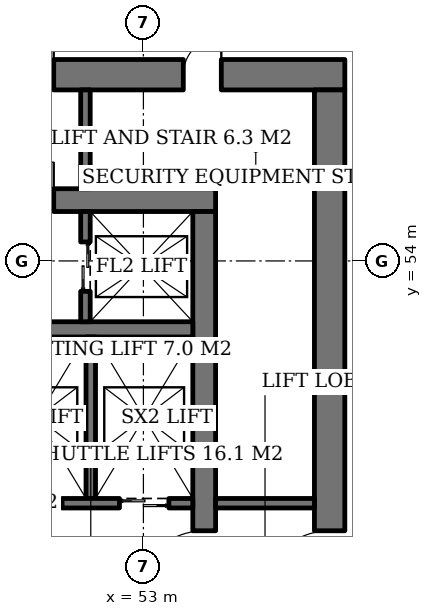
"""IFC4 building model, lengths in metres.
Left out: names, types, materials, properties, quantities, classifications, styles, units other than length and angle.
Written with IfcOpenShell. Run it as: python <this file> out.ifc"""

import sys

from ifc_helpers import new_model, si_unit, direction, frame, frame_2d, origin, place, context, subcontext, project, spatial, rectangle, extrude, element, fill, save


model = new_model("IFC4")
c1 = context("Model", 3, precision=1e-05, world=origin(), true_north=direction((0.0, 1.0)))
c2 = subcontext(c1, "Body", "Model", "MODEL_VIEW")
j1 = project(units=[si_unit("LENGTHUNIT", "METRE"), si_unit("PLANEANGLEUNIT", "RADIAN")], contexts=[c1])
p1 = place(None, origin())
s1 = spatial("IfcSite", under=j1, at=p1, CompositionType="ELEMENT")
p2 = place(p1, origin())
s2 = spatial("IfcBuilding", under=s1, at=p2, CompositionType="ELEMENT")
p3 = place(p2, origin())
s3 = spatial("IfcBuildingStorey", under=s2, at=p3, CompositionType="ELEMENT", Elevation=0.0)
p4 = place(p3, frame((35.1, 55.6, 0.0), z_axis=(0.0, 0.0, 1.0), x_axis=(1.0, 0.0, 0.0)))
e1 = element("IfcWall", 1, at=p4, inside=s3, PredefinedType="SHEAR", context=c2, shape_type="SweptSolid", body=[
    extrude(rectangle(XDim=19.8, YDim=0.6, at=frame_2d((9.9, 0.0))), origin(), (0.0, 0.0, 1.0), 6.0),
])
p5 = place(p4, frame((14.54, 0.0, 0.0)))
e2 = element("IfcOpeningElement", 2, at=p5, cuts=e1, PredefinedType="OPENING", context=c2, shape_type="SweptSolid", body=[
    extrude(rectangle(XDim=1.0, YDim=2.1, at=frame_2d((0.5, 1.05))), frame((0.0, 0.31, 0.0), z_axis=(0.0, -1.0, 0.0), x_axis=(1.0, 0.0, 0.0)), (0.0, 0.0, 1.0), 0.62),
])
p6 = place(p4, frame((12.18, 0.0, 0.0)))
e3 = element("IfcOpeningElement", 3, at=p6, cuts=e1, PredefinedType="OPENING", context=c2, shape_type="SweptSolid", body=[
    extrude(rectangle(XDim=1.0, YDim=2.1, at=frame_2d((0.5, 1.05))), frame((0.0, 0.31, 0.0), z_axis=(0.0, -1.0, 0.0), x_axis=(1.0, 0.0, 0.0)), (0.0, 0.0, 1.0), 0.62),
])
p7 = place(p4, frame((2.425, 0.0, 0.0)))
e4 = element("IfcOpeningElement", 4, at=p7, cuts=e1, PredefinedType="OPENING", context=c2, shape_type="SweptSolid", body=[
    extrude(rectangle(XDim=1.0, YDim=2.1, at=frame_2d((0.5, 1.05))), frame((0.0, 0.31, 0.0), z_axis=(0.0, -1.0, 0.0), x_axis=(1.0, 0.0, 0.0)), (0.0, 0.0, 1.0), 0.62),
])
p8 = place(p3, frame((54.6, 36.7, 0.0), z_axis=(0.0, 0.0, 1.0), x_axis=(0.0, 1.0, 0.0)))
e5 = element("IfcWall", 5, at=p8, inside=s3, PredefinedType="SHEAR", context=c2, shape_type="SweptSolid", body=[
    extrude(rectangle(XDim=18.6, YDim=0.6, at=frame_2d((9.3, 0.0))), origin(), (0.0, 0.0, 1.0), 6.0),
])
p9 = place(p8, frame((8.4, 0.0, 0.0)))
e6 = element("IfcOpeningElement", 6, at=p9, cuts=e5, PredefinedType="OPENING", context=c2, shape_type="SweptSolid", body=[
    extrude(rectangle(XDim=1.8, YDim=2.4, at=frame_2d((0.9, 1.2))), frame((0.0, 0.31, 0.0), z_axis=(0.0, -1.0, 0.0), x_axis=(1.0, 0.0, 0.0)), (0.0, 0.0, 1.0), 0.62),
])
p10 = place(p3, frame((31.7, 58.9, 0.0), z_axis=(0.0, 0.0, 1.0), x_axis=(1.0, 0.0, 0.0)))
e7 = element("IfcWall", 7, at=p10, inside=s3, PredefinedType="SHEAR", context=c2, shape_type="SweptSolid", body=[
    extrude(rectangle(XDim=26.6, YDim=0.8, at=frame_2d((13.3, 0.0))), origin(), (0.0, 0.0, 1.0), 6.0),
])
p11 = place(p10, frame((17.94, 0.0, 0.0)))
e8 = element("IfcOpeningElement", 8, at=p11, cuts=e7, PredefinedType="OPENING", context=c2, shape_type="SweptSolid", body=[
    extrude(rectangle(XDim=1.0, YDim=2.1, at=frame_2d((0.5, 1.05))), frame((0.0, 0.41, 0.0), z_axis=(0.0, -1.0, 0.0), x_axis=(1.0, 0.0, 0.0)), (0.0, 0.0, 1.0), 0.82),
])
p12 = place(p10, frame((12.44, 0.0, 0.0)))
e9 = element("IfcOpeningElement", 9, at=p12, cuts=e7, PredefinedType="OPENING", context=c2, shape_type="SweptSolid", body=[
    extrude(rectangle(XDim=1.0, YDim=2.1, at=frame_2d((0.5, 1.05))), frame((0.0, 0.41, 0.0), z_axis=(0.0, -1.0, 0.0), x_axis=(1.0, 0.0, 0.0)), (0.0, 0.0, 1.0), 0.82),
])
p13 = place(p10, frame((5.825, 0.0, 0.0)))
e10 = element("IfcOpeningElement", 10, at=p13, cuts=e7, PredefinedType="OPENING", context=c2, shape_type="SweptSolid", body=[
    extrude(rectangle(XDim=1.0, YDim=2.1, at=frame_2d((0.5, 1.05))), frame((0.0, 0.41, 0.0), z_axis=(0.0, -1.0, 0.0), x_axis=(1.0, 0.0, 0.0)), (0.0, 0.0, 1.0), 0.82),
])
p14 = place(p10, frame((1.9, 0.0, 0.0)))
e11 = element("IfcOpeningElement", 11, at=p14, cuts=e7, PredefinedType="OPENING", context=c2, shape_type="SweptSolid", body=[
    extrude(rectangle(XDim=1.0, YDim=2.1, at=frame_2d((0.5, 1.05))), frame((0.0, 0.41, 0.0), z_axis=(0.0, -1.0, 0.0), x_axis=(1.0, 0.0, 0.0)), (0.0, 0.0, 1.0), 0.82),
])
p15 = place(p10, frame((4.134, 0.0, 0.0)))
e12 = element("IfcOpeningElement", 12, at=p15, cuts=e7, PredefinedType="OPENING", context=c2, shape_type="SweptSolid", body=[
    extrude(rectangle(XDim=1.0, YDim=2.1, at=frame_2d((0.5, 1.05))), frame((0.0, 0.41, 0.0), z_axis=(0.0, -1.0, 0.0), x_axis=(1.0, 0.0, 0.0)), (0.0, 0.0, 1.0), 0.82),
])
p16 = place(p10, frame((22.35, 0.0, 0.0)))
e13 = element("IfcOpeningElement", 13, at=p16, cuts=e7, PredefinedType="OPENING", context=c2, shape_type="SweptSolid", body=[
    extrude(rectangle(XDim=1.0, YDim=2.1, at=frame_2d((0.5, 1.05))), frame((0.0, 0.41, 0.0), z_axis=(0.0, -1.0, 0.0), x_axis=(1.0, 0.0, 0.0)), (0.0, 0.0, 1.0), 0.82),
])
p17 = place(p3, frame((57.9, 33.5, 0.0), z_axis=(0.0, 0.0, 1.0), x_axis=(0.0, 1.0, 0.0)))
e14 = element("IfcWall", 14, at=p17, inside=s3, PredefinedType="SHEAR", context=c2, shape_type="SweptSolid", body=[
    extrude(rectangle(XDim=25.0, YDim=0.8, at=frame_2d((12.5, 0.0))), origin(), (0.0, 0.0, 1.0), 6.0),
])
p18 = place(p17, frame((11.6, 0.0, 0.0)))
e15 = element("IfcOpeningElement", 15, at=p18, cuts=e14, PredefinedType="OPENING", context=c2, shape_type="SweptSolid", body=[
    extrude(rectangle(XDim=1.8, YDim=2.4, at=frame_2d((0.9, 1.2))), frame((0.0, 0.41, 0.0), z_axis=(0.0, -1.0, 0.0), x_axis=(1.0, 0.0, 0.0)), (0.0, 0.0, 1.0), 0.82),
])
p19 = place(p3, frame((35.7, 52.2, 0.0), z_axis=(0.0, 0.0, 1.0), x_axis=(1.0, 0.0, 0.0)))
e16 = element("IfcWall", 16, at=p19, inside=s3, PredefinedType="SHEAR", context=c2, shape_type="SweptSolid", body=[
    extrude(rectangle(XDim=18.6, YDim=0.4, at=frame_2d((9.3, 0.0))), origin(), (0.0, 0.0, 1.0), 6.0),
])
p20 = place(p3, frame((51.475, 52.4, 0.0), z_axis=(0.0, 0.0, 1.0), x_axis=(0.0, 1.0, 0.0)))
e17 = element("IfcWall", 17, at=p20, inside=s3, PredefinedType="SHEAR", context=c2, shape_type="SweptSolid", body=[
    extrude(rectangle(XDim=2.9, YDim=0.25, at=frame_2d((1.45, 0.0))), origin(), (0.0, 0.0, 1.0), 6.0),
])
p21 = place(p20, frame((0.8, 0.0, 0.0)))
e18 = element("IfcOpeningElement", 18, at=p21, cuts=e17, PredefinedType="OPENING", context=c2, shape_type="SweptSolid", body=[
    extrude(rectangle(XDim=1.3, YDim=2.2, at=frame_2d((0.65, 1.1))), frame((0.0, 0.135, 0.0), z_axis=(0.0, -1.0, 0.0), x_axis=(1.0, 0.0, 0.0)), (0.0, 0.0, 1.0), 0.27),
])
p22 = place(p3, frame((51.615, 47.75, 0.0), z_axis=(0.0, 0.0, 1.0), x_axis=(0.0, 1.0, 0.0)))
e19 = element("IfcWall", 19, at=p22, inside=s3, PredefinedType="SHEAR", context=c2, shape_type="SweptSolid", body=[
    extrude(rectangle(XDim=4.25, YDim=0.25, at=frame_2d((2.125, 0.0))), origin(), (0.0, 0.0, 1.0), 6.0),
])
p23 = place(p3, frame((48.93, 47.625, 0.0), z_axis=(0.0, 0.0, 1.0), x_axis=(1.0, 0.0, 0.0)))
e20 = element("IfcWall", 20, at=p23, inside=s3, PredefinedType="SHEAR", context=c2, shape_type="SweptSolid", body=[
    extrude(rectangle(XDim=5.37, YDim=0.25, at=frame_2d((2.685, 0.0))), origin(), (0.0, 0.0, 1.0), 6.0),
])
p24 = place(p23, frame((0.63, 0.0, 0.0)))
e21 = element("IfcOpeningElement", 21, at=p24, cuts=e20, PredefinedType="OPENING", context=c2, shape_type="SweptSolid", body=[
    extrude(rectangle(XDim=1.3, YDim=2.2, at=frame_2d((0.65, 1.1))), frame((0.0, 0.135, 0.0), z_axis=(0.0, -1.0, 0.0), x_axis=(1.0, 0.0, 0.0)), (0.0, 0.0, 1.0), 0.27),
])
p25 = place(p23, frame((3.44, 0.0, 0.0)))
e22 = element("IfcOpeningElement", 22, at=p25, cuts=e20, PredefinedType="OPENING", context=c2, shape_type="SweptSolid", body=[
    extrude(rectangle(XDim=1.3, YDim=2.2, at=frame_2d((0.65, 1.1))), frame((0.0, 0.135, 0.0), z_axis=(0.0, -1.0, 0.0), x_axis=(1.0, 0.0, 0.0)), (0.0, 0.0, 1.0), 0.27),
])
for number, where, z_axis, x_axis in (
    (23, (51.475, 55.9, 0.0), (0.0, 0.0, 1.0), (0.0, 1.0, 0.0)),
    (24, (54.9, 47.625, 0.0), (0.0, 0.0, 1.0), (1.0, 0.0, 0.0)),
):
    element("IfcWall", number, at=place(p3, frame(where, z_axis=z_axis, x_axis=x_axis)), inside=s3, PredefinedType="SOLIDWALL", context=c2, shape_type="SweptSolid", body=[
        extrude(rectangle(XDim=2.6, YDim=0.25, at=frame_2d((1.3, 0.0))), origin(), (0.0, 0.0, 1.0), 5.7),
    ])
p26 = place(p21, origin())
e25 = element("IfcDoor", 25, at=p26, inside=s3, OperationType="DOUBLE_DOOR_SLIDING", PredefinedType="DOOR", context=c2, shape_type="SweptSolid", body=[
    extrude(rectangle(XDim=1.3, YDim=2.2, at=frame_2d((0.65, 1.1))), frame((0.0, 0.025, 0.0), z_axis=(0.0, -1.0, 0.0), x_axis=(1.0, 0.0, 0.0)), (0.0, 0.0, 1.0), 0.05),
])
fill(e18, e25)
p27 = place(p24, origin())
e26 = element("IfcDoor", 26, at=p27, inside=s3, OperationType="DOUBLE_DOOR_SLIDING", PredefinedType="DOOR", context=c2, shape_type="SweptSolid", body=[
    extrude(rectangle(XDim=1.3, YDim=2.2, at=frame_2d((0.65, 1.1))), frame((0.0, 0.025, 0.0), z_axis=(0.0, -1.0, 0.0), x_axis=(1.0, 0.0, 0.0)), (0.0, 0.0, 1.0), 0.05),
])
fill(e21, e26)
p28 = place(p25, origin())
e27 = element("IfcDoor", 27, at=p28, inside=s3, OperationType="DOUBLE_DOOR_SLIDING", PredefinedType="DOOR", context=c2, shape_type="SweptSolid", body=[
    extrude(rectangle(XDim=1.3, YDim=2.2, at=frame_2d((0.65, 1.1))), frame((0.0, 0.025, 0.0), z_axis=(0.0, -1.0, 0.0), x_axis=(1.0, 0.0, 0.0)), (0.0, 0.0, 1.0), 0.05),
])
fill(e22, e27)
p29 = place(p5, origin())
e28 = element("IfcDoor", 28, at=p29, inside=s3, OperationType="SINGLE_SWING_RIGHT", PredefinedType="DOOR", context=c2, shape_type="SweptSolid", body=[
    extrude(rectangle(XDim=1.0, YDim=2.1, at=frame_2d((0.5, 1.05))), frame((0.0, 0.025, 0.0), z_axis=(0.0, -1.0, 0.0), x_axis=(1.0, 0.0, 0.0)), (0.0, 0.0, 1.0), 0.05),
])
fill(e2, e28)
p30 = place(p9, origin())
e29 = element("IfcDoor", 29, at=p30, inside=s3, OperationType="DOUBLE_DOOR_SINGLE_SWING", PredefinedType="DOOR", context=c2, shape_type="SweptSolid", body=[
    extrude(rectangle(XDim=1.8, YDim=2.4, at=frame_2d((0.9, 1.2))), frame((0.0, 0.025, 0.0), z_axis=(0.0, -1.0, 0.0), x_axis=(1.0, 0.0, 0.0)), (0.0, 0.0, 1.0), 0.05),
])
fill(e6, e29)
p31 = place(p18, origin())
e30 = element("IfcDoor", 30, at=p31, inside=s3, OperationType="DOUBLE_DOOR_SINGLE_SWING", PredefinedType="DOOR", context=c2, shape_type="SweptSolid", body=[
    extrude(rectangle(XDim=1.8, YDim=2.4, at=frame_2d((0.9, 1.2))), frame((0.0, 0.025, 0.0), z_axis=(0.0, -1.0, 0.0), x_axis=(1.0, 0.0, 0.0)), (0.0, 0.0, 1.0), 0.05),
])
fill(e15, e30)
p32 = place(p11, origin())
e31 = element("IfcDoor", 31, at=p32, inside=s3, OperationType="SINGLE_SWING_RIGHT", PredefinedType="DOOR", context=c2, shape_type="SweptSolid", body=[
    extrude(rectangle(XDim=1.0, YDim=2.1, at=frame_2d((0.5, 1.05))), frame((0.0, 0.025, 0.0), z_axis=(0.0, -1.0, 0.0), x_axis=(1.0, 0.0, 0.0)), (0.0, 0.0, 1.0), 0.05),
])
fill(e8, e31)
p33 = place(p16, origin())
e32 = element("IfcDoor", 32, at=p33, inside=s3, OperationType="SINGLE_SWING_RIGHT", PredefinedType="DOOR", context=c2, shape_type="SweptSolid", body=[
    extrude(rectangle(XDim=1.0, YDim=2.1, at=frame_2d((0.5, 1.05))), frame((0.0, -0.34, 0.0), z_axis=(0.0, -1.0, 0.0), x_axis=(1.0, 0.0, 0.0)), (0.0, 0.0, 1.0), 0.05),
])
fill(e13, e32)
save(model, sys.argv[1])
